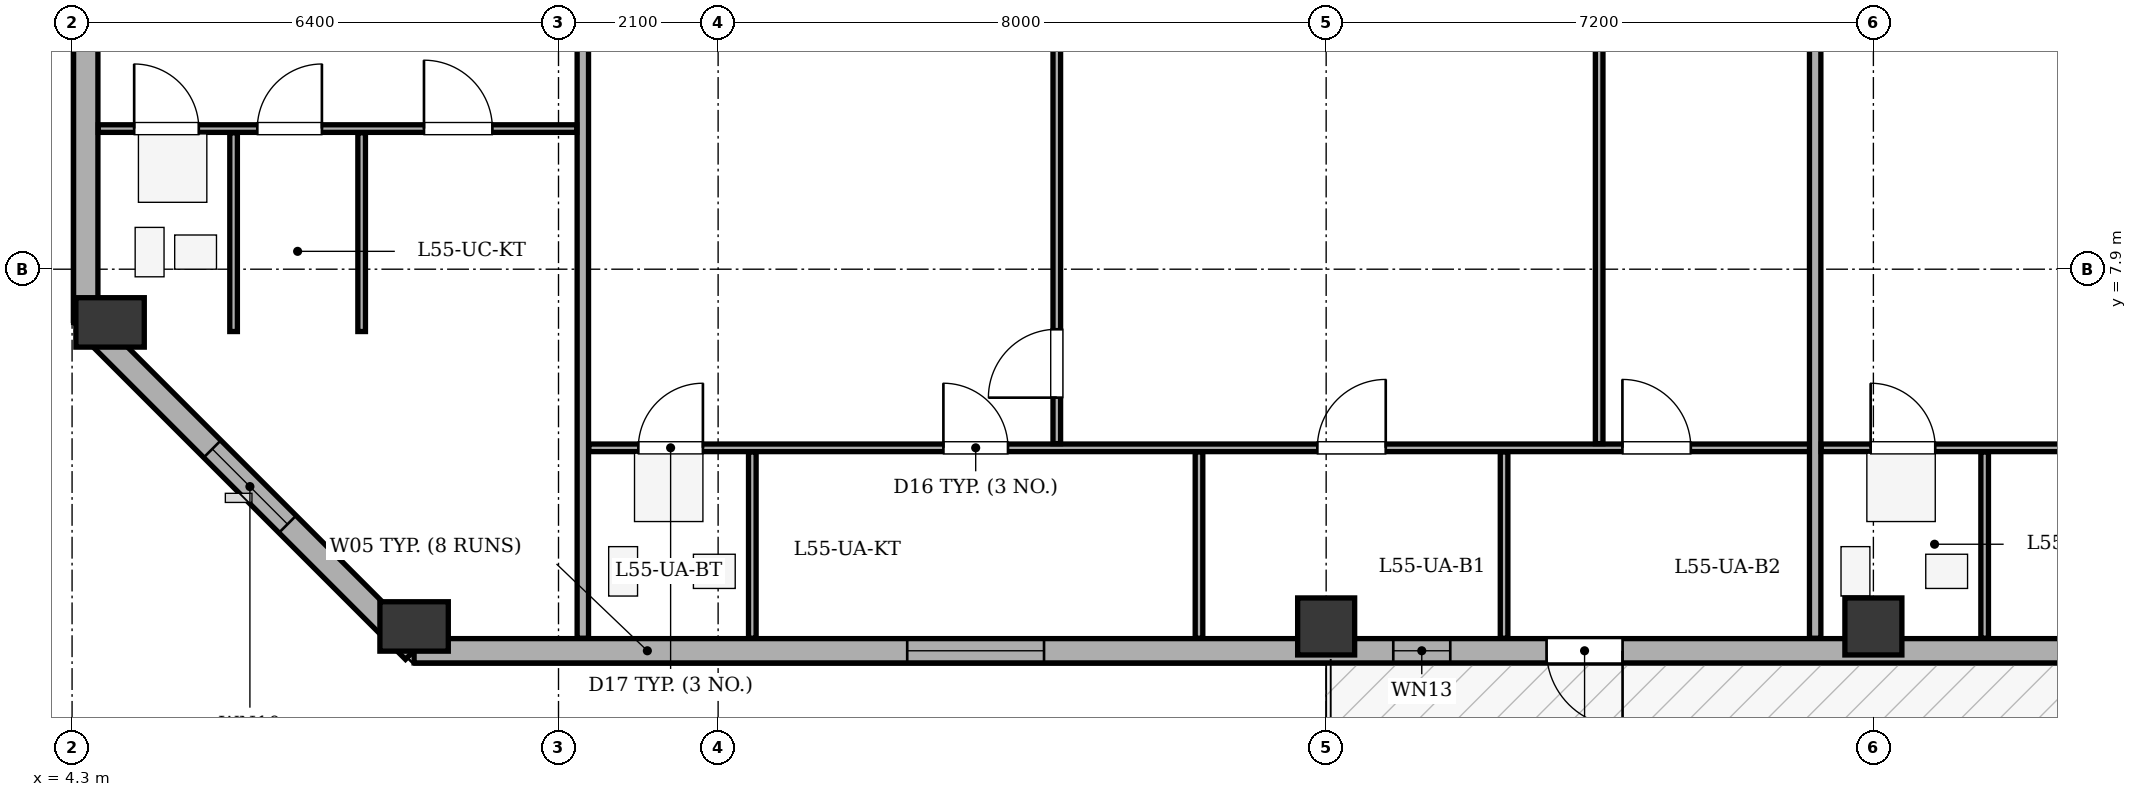
"""IFC4 building model, lengths in metres.
Left out: names, types, materials, properties, quantities, classifications, styles, units other than length and angle.
Written with IfcOpenShell. Run it as: python <this file> out.ifc"""

import sys

from ifc_helpers import new_model, si_unit, direction, frame, frame_2d, origin, origin_2d, place, context, subcontext, project, spatial, rectangle, extrude, element, fill, save


model = new_model("IFC4")
c1 = context("Model", 3, precision=1e-05, world=origin(), true_north=direction((0.0, 1.0)))
c2 = subcontext(c1, "Body", "Model", "MODEL_VIEW")
j1 = project(units=[si_unit("LENGTHUNIT", "METRE"), si_unit("PLANEANGLEUNIT", "RADIAN")], contexts=[c1])
p1 = place(None, origin())
s1 = spatial("IfcSite", under=j1, at=p1, CompositionType="ELEMENT")
p2 = place(p1, origin())
s2 = spatial("IfcBuilding", under=s1, at=p2, CompositionType="ELEMENT")
p3 = place(p2, frame((0.0, 0.0, 214.3)))
s3 = spatial("IfcBuildingStorey", under=s2, at=p3, CompositionType="ELEMENT", Elevation=214.3)
p4 = place(p3, frame((8.8, 3.2, 0.0), z_axis=(0.0, 0.0, 1.0), x_axis=(1.0, 0.0, 0.0)))
e1 = element("IfcColumn", 1, at=p4, inside=s3, PredefinedType="COLUMN", context=c2, shape_type="SweptSolid", body=[
    extrude(rectangle(XDim=0.65, YDim=0.9, at=origin_2d()), origin(), (0.0, 0.0, 1.0), 3.4),
])
for number, where, z_axis, x_axis in (
    (2, (20.8, 3.2, 0.0), (0.0, 0.0, 1.0), (1.0, 0.0, 0.0)),
    (3, (28.0, 3.2, 0.0), (0.0, 0.0, 1.0), (1.0, 0.0, 0.0)),
):
    element("IfcColumn", number, at=place(p3, frame(where, z_axis=z_axis, x_axis=x_axis)), inside=s3, PredefinedType="COLUMN", context=c2, shape_type="SweptSolid", body=[
        extrude(rectangle(XDim=0.75, YDim=0.75, at=origin_2d()), origin(), (0.0, 0.0, 1.0), 3.4),
    ])
p5 = place(p3, frame((4.8, 7.2, 0.0), z_axis=(0.0, 0.0, 1.0), x_axis=(1.0, 0.0, 0.0)))
e4 = element("IfcColumn", 4, at=p5, inside=s3, PredefinedType="COLUMN", context=c2, shape_type="SweptSolid", body=[
    extrude(rectangle(XDim=0.65, YDim=0.9, at=origin_2d()), origin(), (0.0, 0.0, 1.0), 3.4),
])
p6 = place(p3, frame((44.8, 2.88, 0.0), z_axis=(0.0, 0.0, 1.0), x_axis=(-1.0, 0.0, 0.0)))
e5 = element("IfcWall", 5, at=p6, inside=s3, PredefinedType="STANDARD", context=c2, shape_type="SweptSolid", body=[
    extrude(rectangle(XDim=36.0, YDim=0.32, at=frame_2d((18.0, 0.0))), origin(), (0.0, 0.0, 1.0), 2.725),
])
p7 = place(p6, frame((20.1, 0.0, 0.0)))
e6 = element("IfcOpeningElement", 6, at=p7, cuts=e5, PredefinedType="OPENING", context=c2, shape_type="SweptSolid", body=[
    extrude(rectangle(XDim=1.0, YDim=2.02, at=frame_2d((0.5, 1.01))), frame((0.0, 0.17, 0.0), z_axis=(0.0, -1.0, 0.0), x_axis=(1.0, 0.0, 0.0)), (0.0, 0.0, 1.0), 0.34),
])
p8 = place(p6, frame((1.416, 0.0, 0.75)))
e7 = element("IfcOpeningElement", 7, at=p8, cuts=e5, PredefinedType="OPENING", context=c2, shape_type="SweptSolid", body=[
    extrude(rectangle(XDim=1.8, YDim=1.7, at=frame_2d((0.9, 0.85))), frame((0.0, 0.17, 0.0), z_axis=(0.0, -1.0, 0.0), x_axis=(1.0, 0.0, 0.0)), (0.0, 0.0, 1.0), 0.34),
])
p9 = place(p6, frame((5.707, 0.0, 0.75)))
e8 = element("IfcOpeningElement", 8, at=p9, cuts=e5, PredefinedType="OPENING", context=c2, shape_type="SweptSolid", body=[
    extrude(rectangle(XDim=1.8, YDim=1.7, at=frame_2d((0.9, 0.85))), frame((0.0, 0.17, 0.0), z_axis=(0.0, -1.0, 0.0), x_axis=(1.0, 0.0, 0.0)), (0.0, 0.0, 1.0), 0.34),
])
p10 = place(p6, frame((11.63, 0.0, 0.75)))
e9 = element("IfcOpeningElement", 9, at=p10, cuts=e5, PredefinedType="OPENING", context=c2, shape_type="SweptSolid", body=[
    extrude(rectangle(XDim=1.8, YDim=1.7, at=frame_2d((0.9, 0.85))), frame((0.0, 0.17, 0.0), z_axis=(0.0, -1.0, 0.0), x_axis=(1.0, 0.0, 0.0)), (0.0, 0.0, 1.0), 0.34),
])
p11 = place(p6, frame((27.712, 0.0, 0.75)))
e10 = element("IfcOpeningElement", 10, at=p11, cuts=e5, PredefinedType="OPENING", context=c2, shape_type="SweptSolid", body=[
    extrude(rectangle(XDim=1.8, YDim=1.7, at=frame_2d((0.9, 0.85))), frame((0.0, 0.17, 0.0), z_axis=(0.0, -1.0, 0.0), x_axis=(1.0, 0.0, 0.0)), (0.0, 0.0, 1.0), 0.34),
])
p12 = place(p6, frame((22.367, 0.0, 0.75)))
e11 = element("IfcOpeningElement", 11, at=p12, cuts=e5, PredefinedType="OPENING", context=c2, shape_type="SweptSolid", body=[
    extrude(rectangle(XDim=0.75, YDim=1.45, at=frame_2d((0.375, 0.725))), frame((0.0, 0.17, 0.0), z_axis=(0.0, -1.0, 0.0), x_axis=(1.0, 0.0, 0.0)), (0.0, 0.0, 1.0), 0.34),
])
p13 = place(p3, frame((8.8, 2.88, 0.0), z_axis=(0.0, 0.0, 1.0), x_axis=(-0.707106781187, 0.707106781187, 0.0)))
e12 = element("IfcWall", 12, at=p13, inside=s3, PredefinedType="STANDARD", context=c2, shape_type="SweptSolid", body=[
    extrude(rectangle(XDim=6.11, YDim=0.32, at=frame_2d((3.055, 0.0))), origin(), (0.0, 0.0, 1.0), 2.725),
])
p14 = place(p13, frame((2.355, 0.0, 0.75)))
e13 = element("IfcOpeningElement", 13, at=p14, cuts=e12, PredefinedType="OPENING", context=c2, shape_type="SweptSolid", body=[
    extrude(rectangle(XDim=1.4, YDim=1.65, at=frame_2d((0.7, 0.825))), frame((0.0, 0.17, 0.0), z_axis=(0.0, -1.0, 0.0), x_axis=(1.0, 0.0, 0.0)), (0.0, 0.0, 1.0), 0.34),
])
p15 = place(p3, frame((4.48, 7.2, 0.0), z_axis=(0.0, 0.0, 1.0), x_axis=(0.0, 1.0, 0.0)))
e14 = element("IfcWall", 14, at=p15, inside=s3, PredefinedType="STANDARD", context=c2, shape_type="SweptSolid", body=[
    extrude(rectangle(XDim=27.8, YDim=0.32, at=frame_2d((13.9, 0.0))), origin(), (0.0, 0.0, 1.0), 2.725),
])
p16 = place(p15, frame((4.73, 0.0, 0.75)))
e15 = element("IfcOpeningElement", 15, at=p16, cuts=e14, PredefinedType="OPENING", context=c2, shape_type="SweptSolid", body=[
    extrude(rectangle(XDim=1.8, YDim=1.7, at=frame_2d((0.9, 0.85))), frame((0.0, 0.17, 0.0), z_axis=(0.0, -1.0, 0.0), x_axis=(1.0, 0.0, 0.0)), (0.0, 0.0, 1.0), 0.34),
])
p17 = place(p15, frame((9.295, 0.0, 0.75)))
e16 = element("IfcOpeningElement", 16, at=p17, cuts=e14, PredefinedType="OPENING", context=c2, shape_type="SweptSolid", body=[
    extrude(rectangle(XDim=2.2, YDim=1.7, at=frame_2d((1.1, 0.85))), frame((0.0, 0.17, 0.0), z_axis=(0.0, -1.0, 0.0), x_axis=(1.0, 0.0, 0.0)), (0.0, 0.0, 1.0), 0.34),
])
p18 = place(p15, frame((14.669, 0.0, 0.75)))
e17 = element("IfcOpeningElement", 17, at=p18, cuts=e14, PredefinedType="OPENING", context=c2, shape_type="SweptSolid", body=[
    extrude(rectangle(XDim=1.25, YDim=1.7, at=frame_2d((0.625, 0.85))), frame((0.0, 0.17, 0.0), z_axis=(0.0, -1.0, 0.0), x_axis=(1.0, 0.0, 0.0)), (0.0, 0.0, 1.0), 0.34),
])
p19 = place(p15, frame((18.649, 0.0, 0.75)))
e18 = element("IfcOpeningElement", 18, at=p19, cuts=e14, PredefinedType="OPENING", context=c2, shape_type="SweptSolid", body=[
    extrude(rectangle(XDim=1.8, YDim=1.7, at=frame_2d((0.9, 0.85))), frame((0.0, 0.17, 0.0), z_axis=(0.0, -1.0, 0.0), x_axis=(1.0, 0.0, 0.0)), (0.0, 0.0, 1.0), 0.34),
])
p20 = place(p15, frame((22.488, 0.0, 0.75)))
e19 = element("IfcOpeningElement", 19, at=p20, cuts=e14, PredefinedType="OPENING", context=c2, shape_type="SweptSolid", body=[
    extrude(rectangle(XDim=2.2, YDim=1.7, at=frame_2d((1.1, 0.85))), frame((0.0, 0.17, 0.0), z_axis=(0.0, -1.0, 0.0), x_axis=(1.0, 0.0, 0.0)), (0.0, 0.0, 1.0), 0.34),
])
p21 = place(p3, frame((11.02, 3.045, 0.0), z_axis=(0.0, 0.0, 1.0), x_axis=(0.0, 1.0, 0.0)))
e20 = element("IfcWall", 20, at=p21, inside=s3, PredefinedType="PARTITIONING", context=c2, shape_type="SweptSolid", body=[
    extrude(rectangle(XDim=15.255, YDim=0.15, at=frame_2d((7.627, 0.0))), origin(), (0.0, 0.0, 1.0), 3.1),
])
p22 = place(p3, frame((11.1, 5.55, 0.0), z_axis=(0.0, 0.0, 1.0), x_axis=(1.0, 0.0, 0.0)))
e21 = element("IfcWall", 21, at=p22, inside=s3, PredefinedType="PARTITIONING", context=c2, shape_type="SweptSolid", body=[
    extrude(rectangle(XDim=16.174, YDim=0.1, at=frame_2d((8.087, 0.0))), origin(), (0.0, 0.0, 1.0), 3.1),
])
p23 = place(p22, frame((0.65, 0.0, 0.0)))
e22 = element("IfcOpeningElement", 22, at=p23, cuts=e21, PredefinedType="OPENING", context=c2, shape_type="SweptSolid", body=[
    extrude(rectangle(XDim=0.85, YDim=2.05, at=frame_2d((0.425, 1.025))), frame((0.0, 0.06, 0.0), z_axis=(0.0, -1.0, 0.0), x_axis=(1.0, 0.0, 0.0)), (0.0, 0.0, 1.0), 0.12),
])
p24 = place(p22, frame((4.664, 0.0, 0.0)))
e23 = element("IfcOpeningElement", 23, at=p24, cuts=e21, PredefinedType="OPENING", context=c2, shape_type="SweptSolid", body=[
    extrude(rectangle(XDim=0.85, YDim=2.05, at=frame_2d((0.425, 1.025))), frame((0.0, 0.06, 0.0), z_axis=(0.0, -1.0, 0.0), x_axis=(1.0, 0.0, 0.0)), (0.0, 0.0, 1.0), 0.12),
])
p25 = place(p22, frame((9.584, 0.0, 0.0)))
e24 = element("IfcOpeningElement", 24, at=p25, cuts=e21, PredefinedType="OPENING", context=c2, shape_type="SweptSolid", body=[
    extrude(rectangle(XDim=0.9, YDim=2.05, at=frame_2d((0.45, 1.025))), frame((0.0, 0.06, 0.0), z_axis=(0.0, -1.0, 0.0), x_axis=(1.0, 0.0, 0.0)), (0.0, 0.0, 1.0), 0.12),
])
p26 = place(p22, frame((13.598, 0.0, 0.0)))
e25 = element("IfcOpeningElement", 25, at=p26, cuts=e21, PredefinedType="OPENING", context=c2, shape_type="SweptSolid", body=[
    extrude(rectangle(XDim=0.9, YDim=2.05, at=frame_2d((0.45, 1.025))), frame((0.0, 0.06, 0.0), z_axis=(0.0, -1.0, 0.0), x_axis=(1.0, 0.0, 0.0)), (0.0, 0.0, 1.0), 0.12),
])
p27 = place(p3, frame((24.392, 5.605, 0.0), z_axis=(0.0, 0.0, 1.0), x_axis=(0.0, 1.0, 0.0)))
e26 = element("IfcWall", 26, at=p27, inside=s3, PredefinedType="PARTITIONING", context=c2, shape_type="SweptSolid", body=[
    extrude(rectangle(XDim=12.695, YDim=0.1, at=frame_2d((6.348, 0.0))), origin(), (0.0, 0.0, 1.0), 3.1),
])
p28 = place(p27, frame((5.91, 0.0, 0.0)))
e27 = element("IfcOpeningElement", 27, at=p28, cuts=e26, PredefinedType="OPENING", context=c2, shape_type="SweptSolid", body=[
    extrude(rectangle(XDim=0.9, YDim=2.05, at=frame_2d((0.45, 1.025))), frame((0.0, 0.06, 0.0), z_axis=(0.0, -1.0, 0.0), x_axis=(1.0, 0.0, 0.0)), (0.0, 0.0, 1.0), 0.12),
])
p29 = place(p3, frame((17.256, 5.605, 0.0), z_axis=(0.0, 0.0, 1.0), x_axis=(0.0, 1.0, 0.0)))
e28 = element("IfcWall", 28, at=p29, inside=s3, PredefinedType="PARTITIONING", context=c2, shape_type="SweptSolid", body=[
    extrude(rectangle(XDim=12.695, YDim=0.1, at=frame_2d((6.348, 0.0))), origin(), (0.0, 0.0, 1.0), 3.1),
])
p30 = place(p29, frame((0.605, 0.0, 0.0)))
e29 = element("IfcOpeningElement", 29, at=p30, cuts=e28, PredefinedType="OPENING", context=c2, shape_type="SweptSolid", body=[
    extrude(rectangle(XDim=0.9, YDim=2.05, at=frame_2d((0.45, 1.025))), frame((0.0, 0.06, 0.0), z_axis=(0.0, -1.0, 0.0), x_axis=(1.0, 0.0, 0.0)), (0.0, 0.0, 1.0), 0.12),
])
for number, where, z_axis, x_axis in (
    (30, (13.25, 3.045, 0.0), (0.0, 0.0, 1.0), (0.0, 1.0, 0.0)),
    (31, (19.127, 3.045, 0.0), (0.0, 0.0, 1.0), (0.0, 1.0, 0.0)),
    (32, (23.141, 3.045, 0.0), (0.0, 0.0, 1.0), (0.0, 1.0, 0.0)),
):
    element("IfcWall", number, at=place(p3, frame(where, z_axis=z_axis, x_axis=x_axis)), inside=s3, PredefinedType="PARTITIONING", context=c2, shape_type="SweptSolid", body=[
        extrude(rectangle(XDim=2.45, YDim=0.1, at=frame_2d((1.225, 0.0))), origin(), (0.0, 0.0, 1.0), 3.1),
    ])
p31 = place(p3, frame((27.234, 3.045, 0.0), z_axis=(0.0, 0.0, 1.0), x_axis=(0.0, 1.0, 0.0)))
e33 = element("IfcWall", 33, at=p31, inside=s3, PredefinedType="PARTITIONING", context=c2, shape_type="SweptSolid", body=[
    extrude(rectangle(XDim=15.255, YDim=0.15, at=frame_2d((7.627, 0.0))), origin(), (0.0, 0.0, 1.0), 3.1),
])
p32 = place(p3, frame((27.314, 5.55, 0.0), z_axis=(0.0, 0.0, 1.0), x_axis=(1.0, 0.0, 0.0)))
e34 = element("IfcWall", 34, at=p32, inside=s3, PredefinedType="PARTITIONING", context=c2, shape_type="SweptSolid", body=[
    extrude(rectangle(XDim=17.526, YDim=0.1, at=frame_2d((8.763, 0.0))), origin(), (0.0, 0.0, 1.0), 3.1),
])
p33 = place(p32, frame((0.65, 0.0, 0.0)))
e35 = element("IfcOpeningElement", 35, at=p33, cuts=e34, PredefinedType="OPENING", context=c2, shape_type="SweptSolid", body=[
    extrude(rectangle(XDim=0.85, YDim=2.05, at=frame_2d((0.425, 1.025))), frame((0.0, 0.06, 0.0), z_axis=(0.0, -1.0, 0.0), x_axis=(1.0, 0.0, 0.0)), (0.0, 0.0, 1.0), 0.12),
])
p34 = place(p32, frame((5.001, 0.0, 0.0)))
e36 = element("IfcOpeningElement", 36, at=p34, cuts=e34, PredefinedType="OPENING", context=c2, shape_type="SweptSolid", body=[
    extrude(rectangle(XDim=0.85, YDim=2.05, at=frame_2d((0.425, 1.025))), frame((0.0, 0.06, 0.0), z_axis=(0.0, -1.0, 0.0), x_axis=(1.0, 0.0, 0.0)), (0.0, 0.0, 1.0), 0.12),
])
p35 = place(p32, frame((10.428, 0.0, 0.0)))
e37 = element("IfcOpeningElement", 37, at=p35, cuts=e34, PredefinedType="OPENING", context=c2, shape_type="SweptSolid", body=[
    extrude(rectangle(XDim=0.9, YDim=2.05, at=frame_2d((0.45, 1.025))), frame((0.0, 0.06, 0.0), z_axis=(0.0, -1.0, 0.0), x_axis=(1.0, 0.0, 0.0)), (0.0, 0.0, 1.0), 0.12),
])
p36 = place(p32, frame((14.78, 0.0, 0.0)))
e38 = element("IfcOpeningElement", 38, at=p36, cuts=e34, PredefinedType="OPENING", context=c2, shape_type="SweptSolid", body=[
    extrude(rectangle(XDim=0.9, YDim=2.05, at=frame_2d((0.45, 1.025))), frame((0.0, 0.06, 0.0), z_axis=(0.0, -1.0, 0.0), x_axis=(1.0, 0.0, 0.0)), (0.0, 0.0, 1.0), 0.12),
])
p37 = place(p3, frame((29.464, 3.045, 0.0), z_axis=(0.0, 0.0, 1.0), x_axis=(0.0, 1.0, 0.0)))
e39 = element("IfcWall", 39, at=p37, inside=s3, PredefinedType="PARTITIONING", context=c2, shape_type="SweptSolid", body=[
    extrude(rectangle(XDim=2.45, YDim=0.1, at=frame_2d((1.225, 0.0))), origin(), (0.0, 0.0, 1.0), 3.1),
])
p38 = place(p3, frame((4.645, 9.75, 0.0), z_axis=(0.0, 0.0, 1.0), x_axis=(1.0, 0.0, 0.0)))
e40 = element("IfcWall", 40, at=p38, inside=s3, PredefinedType="PARTITIONING", context=c2, shape_type="SweptSolid", body=[
    extrude(rectangle(XDim=6.295, YDim=0.1, at=frame_2d((3.147, 0.0))), origin(), (0.0, 0.0, 1.0), 3.1),
])
p39 = place(p38, frame((0.472, 0.0, 0.0)))
e41 = element("IfcOpeningElement", 41, at=p39, cuts=e40, PredefinedType="OPENING", context=c2, shape_type="SweptSolid", body=[
    extrude(rectangle(XDim=0.85, YDim=2.05, at=frame_2d((0.425, 1.025))), frame((0.0, 0.06, 0.0), z_axis=(0.0, -1.0, 0.0), x_axis=(1.0, 0.0, 0.0)), (0.0, 0.0, 1.0), 0.12),
])
p40 = place(p38, frame((2.092, 0.0, 0.0)))
e42 = element("IfcOpeningElement", 42, at=p40, cuts=e40, PredefinedType="OPENING", context=c2, shape_type="SweptSolid", body=[
    extrude(rectangle(XDim=0.85, YDim=2.05, at=frame_2d((0.425, 1.025))), frame((0.0, 0.06, 0.0), z_axis=(0.0, -1.0, 0.0), x_axis=(1.0, 0.0, 0.0)), (0.0, 0.0, 1.0), 0.12),
])
p41 = place(p38, frame((4.285, 0.0, 0.0)))
e43 = element("IfcOpeningElement", 43, at=p41, cuts=e40, PredefinedType="OPENING", context=c2, shape_type="SweptSolid", body=[
    extrude(rectangle(XDim=0.9, YDim=2.05, at=frame_2d((0.45, 1.025))), frame((0.0, 0.06, 0.0), z_axis=(0.0, -1.0, 0.0), x_axis=(1.0, 0.0, 0.0)), (0.0, 0.0, 1.0), 0.12),
])
for number, where, z_axis, x_axis in (
    (44, (6.425, 7.08, 0.0), (0.0, 0.0, 1.0), (0.0, 1.0, 0.0)),
    (45, (8.11, 7.08, 0.0), (0.0, 0.0, 1.0), (0.0, 1.0, 0.0)),
):
    element("IfcWall", number, at=place(p3, frame(where, z_axis=z_axis, x_axis=x_axis)), inside=s3, PredefinedType="PARTITIONING", context=c2, shape_type="SweptSolid", body=[
        extrude(rectangle(XDim=2.615, YDim=0.1, at=frame_2d((1.308, 0.0))), origin(), (0.0, 0.0, 1.0), 3.1),
    ])
p42 = place(p7, origin())
e46 = element("IfcDoor", 46, at=p42, inside=s3, OperationType="SINGLE_SWING_LEFT", PredefinedType="DOOR", context=c2, shape_type="SweptSolid", body=[
    extrude(rectangle(XDim=1.0, YDim=2.02, at=frame_2d((0.5, 1.01))), frame((0.0, 0.025, 0.0), z_axis=(0.0, -1.0, 0.0), x_axis=(1.0, 0.0, 0.0)), (0.0, 0.0, 1.0), 0.05),
])
fill(e6, e46)
p43 = place(p11, origin())
e47 = element("IfcWindow", 47, at=p43, inside=s3, PartitioningType="SINGLE_PANEL", PredefinedType="WINDOW", context=c2, shape_type="SweptSolid", body=[
    extrude(rectangle(XDim=1.8, YDim=1.7, at=frame_2d((0.9, 0.85))), frame((0.0, -0.01, 0.0), z_axis=(0.0, -1.0, 0.0), x_axis=(1.0, 0.0, 0.0)), (0.0, 0.0, 1.0), 0.06),
])
fill(e10, e47)
p44 = place(p12, origin())
e48 = element("IfcWindow", 48, at=p44, inside=s3, PartitioningType="SINGLE_PANEL", PredefinedType="WINDOW", context=c2, shape_type="SweptSolid", body=[
    extrude(rectangle(XDim=0.75, YDim=1.45, at=frame_2d((0.375, 0.725))), frame((0.0, -0.01, 0.0), z_axis=(0.0, -1.0, 0.0), x_axis=(1.0, 0.0, 0.0)), (0.0, 0.0, 1.0), 0.06),
])
fill(e11, e48)
p45 = place(p14, origin())
e49 = element("IfcWindow", 49, at=p45, inside=s3, PartitioningType="SINGLE_PANEL", PredefinedType="WINDOW", context=c2, shape_type="SweptSolid", body=[
    extrude(rectangle(XDim=1.4, YDim=1.65, at=frame_2d((0.7, 0.825))), frame((0.0, -0.01, 0.0), z_axis=(0.0, -1.0, 0.0), x_axis=(1.0, 0.0, 0.0)), (0.0, 0.0, 1.0), 0.06),
])
fill(e13, e49)
p46 = place(p30, origin())
e50 = element("IfcDoor", 50, at=p46, inside=s3, OperationType="SINGLE_SWING_LEFT", PredefinedType="DOOR", context=c2, shape_type="SweptSolid", body=[
    extrude(rectangle(XDim=0.9, YDim=2.05, at=frame_2d((0.45, 1.025))), frame((0.0, 0.025, 0.0), z_axis=(0.0, -1.0, 0.0), x_axis=(1.0, 0.0, 0.0)), (0.0, 0.0, 1.0), 0.05),
])
fill(e29, e50)
p47 = place(p23, origin())
e51 = element("IfcDoor", 51, at=p47, inside=s3, OperationType="SINGLE_SWING_RIGHT", PredefinedType="DOOR", context=c2, shape_type="SweptSolid", body=[
    extrude(rectangle(XDim=0.85, YDim=2.05, at=frame_2d((0.425, 1.025))), frame((0.0, 0.025, 0.0), z_axis=(0.0, -1.0, 0.0), x_axis=(1.0, 0.0, 0.0)), (0.0, 0.0, 1.0), 0.05),
])
fill(e22, e51)
p48 = place(p24, origin())
e52 = element("IfcDoor", 52, at=p48, inside=s3, OperationType="SINGLE_SWING_LEFT", PredefinedType="DOOR", context=c2, shape_type="SweptSolid", body=[
    extrude(rectangle(XDim=0.85, YDim=2.05, at=frame_2d((0.425, 1.025))), frame((0.0, 0.025, 0.0), z_axis=(0.0, -1.0, 0.0), x_axis=(1.0, 0.0, 0.0)), (0.0, 0.0, 1.0), 0.05),
])
fill(e23, e52)
p49 = place(p25, origin())
e53 = element("IfcDoor", 53, at=p49, inside=s3, OperationType="SINGLE_SWING_RIGHT", PredefinedType="DOOR", context=c2, shape_type="SweptSolid", body=[
    extrude(rectangle(XDim=0.9, YDim=2.05, at=frame_2d((0.45, 1.025))), frame((0.0, 0.025, 0.0), z_axis=(0.0, -1.0, 0.0), x_axis=(1.0, 0.0, 0.0)), (0.0, 0.0, 1.0), 0.05),
])
fill(e24, e53)
p50 = place(p26, origin())
e54 = element("IfcDoor", 54, at=p50, inside=s3, OperationType="SINGLE_SWING_LEFT", PredefinedType="DOOR", context=c2, shape_type="SweptSolid", body=[
    extrude(rectangle(XDim=0.9, YDim=2.05, at=frame_2d((0.45, 1.025))), frame((0.0, 0.025, 0.0), z_axis=(0.0, -1.0, 0.0), x_axis=(1.0, 0.0, 0.0)), (0.0, 0.0, 1.0), 0.05),
])
fill(e25, e54)
p51 = place(p33, origin())
e55 = element("IfcDoor", 55, at=p51, inside=s3, OperationType="SINGLE_SWING_LEFT", PredefinedType="DOOR", context=c2, shape_type="SweptSolid", body=[
    extrude(rectangle(XDim=0.85, YDim=2.05, at=frame_2d((0.425, 1.025))), frame((0.0, 0.025, 0.0), z_axis=(0.0, -1.0, 0.0), x_axis=(1.0, 0.0, 0.0)), (0.0, 0.0, 1.0), 0.05),
])
fill(e35, e55)
p52 = place(p39, origin())
e56 = element("IfcDoor", 56, at=p52, inside=s3, OperationType="SINGLE_SWING_LEFT", PredefinedType="DOOR", context=c2, shape_type="SweptSolid", body=[
    extrude(rectangle(XDim=0.85, YDim=2.05, at=frame_2d((0.425, 1.025))), frame((0.0, 0.025, 0.0), z_axis=(0.0, -1.0, 0.0), x_axis=(1.0, 0.0, 0.0)), (0.0, 0.0, 1.0), 0.05),
])
fill(e41, e56)
p53 = place(p40, origin())
e57 = element("IfcDoor", 57, at=p53, inside=s3, OperationType="SINGLE_SWING_RIGHT", PredefinedType="DOOR", context=c2, shape_type="SweptSolid", body=[
    extrude(rectangle(XDim=0.85, YDim=2.05, at=frame_2d((0.425, 1.025))), frame((0.0, 0.025, 0.0), z_axis=(0.0, -1.0, 0.0), x_axis=(1.0, 0.0, 0.0)), (0.0, 0.0, 1.0), 0.05),
])
fill(e42, e57)
p54 = place(p41, origin())
e58 = element("IfcDoor", 58, at=p54, inside=s3, OperationType="SINGLE_SWING_LEFT", PredefinedType="DOOR", context=c2, shape_type="SweptSolid", body=[
    extrude(rectangle(XDim=0.9, YDim=2.05, at=frame_2d((0.45, 1.025))), frame((0.0, 0.025, 0.0), z_axis=(0.0, -1.0, 0.0), x_axis=(1.0, 0.0, 0.0)), (0.0, 0.0, 1.0), 0.05),
])
fill(e43, e58)
save(model, sys.argv[1])
